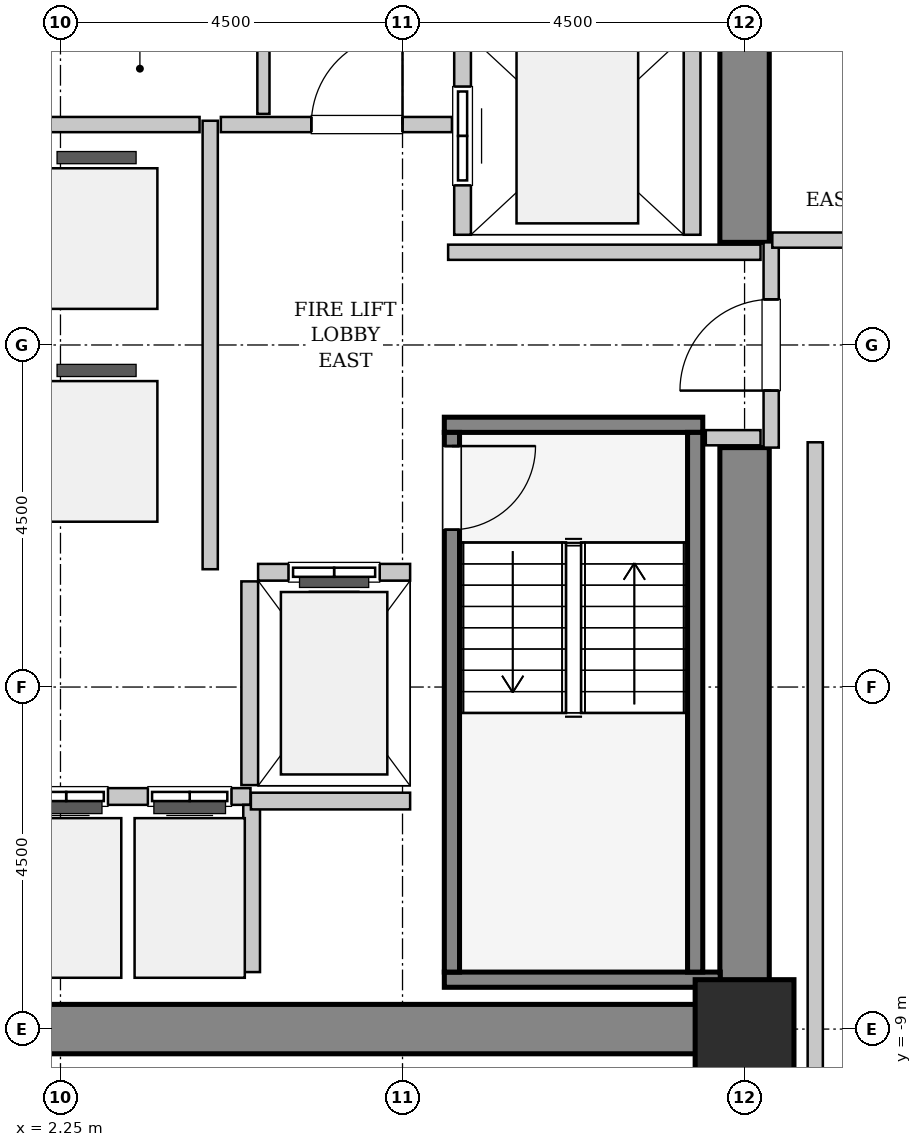
"""IFC4 building model, lengths in metres.
Left out: names, types, materials, properties, quantities, classifications, styles, units other than length and angle.
Written with IfcOpenShell. Run it as: python <this file> out.ifc"""

import sys

from ifc_helpers import new_model, si_unit, direction, frame, frame_2d, origin, origin_2d, place, context, subcontext, project, spatial, rectangle, hollow_rectangle, extrude, source, transform, mapped, element, fill, save


model = new_model("IFC4")
c1 = context("Model", 3, precision=1e-05, world=origin(), true_north=direction((0.0, 1.0)))
c2 = subcontext(c1, "Body", "Model", "MODEL_VIEW")
j1 = project(units=[si_unit("LENGTHUNIT", "METRE"), si_unit("PLANEANGLEUNIT", "RADIAN")], contexts=[c1])
p1 = place(None, origin())
s1 = spatial("IfcSite", under=j1, at=p1, CompositionType="ELEMENT")
p2 = place(p1, origin())
s2 = spatial("IfcBuilding", under=s1, at=p2, CompositionType="ELEMENT")
p3 = place(p2, origin())
s3 = spatial("IfcBuildingStorey", under=s2, at=p3, CompositionType="ELEMENT", Elevation=0.0)
m1 = source(origin(), c2, "Body", "SweptSolid", [
    extrude(rectangle(XDim=10.025, YDim=0.65, at=frame_2d((5.012, 0.0))), origin(), (0.0, 0.0, 1.0), 6.0),
])
p4 = place(p3, frame((1.55, -9.0, 0.0), z_axis=(0.0, 0.0, 1.0), x_axis=(1.0, 0.0, 0.0)))
e1 = element("IfcWall", 1, at=p4, inside=s3, PredefinedType="SHEAR", context=c2, shape_type="MappedRepresentation", body=[
    mapped(m1, transform((0.0, 0.0, 0.0), x_axis=(1.0, 0.0, 0.0), y_axis=(0.0, 1.0, 0.0), z_axis=(0.0, 0.0, 1.0), scale=1.0)),
])
m2 = source(origin(), c2, "Body", "SweptSolid", [
    extrude(rectangle(XDim=7.325, YDim=0.65, at=frame_2d((3.663, 0.0))), origin(), (0.0, 0.0, 1.0), 6.0),
])
for number, where, z_axis, x_axis in (
    (2, (11.25, -8.675, 0.0), (0.0, 0.0, 1.0), (0.0, 1.0, 0.0)),
    (3, (11.25, 1.35, 0.0), (0.0, 0.0, 1.0), (0.0, 1.0, 0.0)),
):
    element("IfcWall", number, at=place(p3, frame(where, z_axis=z_axis, x_axis=x_axis)), inside=s3, PredefinedType="SHEAR", context=c2, shape_type="MappedRepresentation", body=[
        mapped(m2, transform((0.0, 0.0, 0.0), x_axis=(1.0, 0.0, 0.0), y_axis=(0.0, 1.0, 0.0), z_axis=(0.0, 0.0, 1.0), scale=1.0)),
    ])
m3 = source(origin(), c2, "Body", "SweptSolid", [
    extrude(hollow_rectangle(XDim=1.3, YDim=1.3, WallThickness=0.065, InnerFilletRadius=0.065, OuterFilletRadius=0.13, at=origin_2d()), origin(), (0.0, 0.0, 1.0), 6.0),
])
p5 = place(p3, frame((11.25, -9.0, 0.0), z_axis=(0.0, 0.0, 1.0), x_axis=(1.0, 0.0, 0.0)))
e4 = element("IfcColumn", 4, at=p5, inside=s3, PredefinedType="COLUMN", context=c2, shape_type="MappedRepresentation", body=[
    mapped(m3, transform((0.0, 0.0, 0.0), x_axis=(1.0, 0.0, 0.0), y_axis=(0.0, 1.0, 0.0), z_axis=(0.0, 0.0, 1.0), scale=1.0)),
])
m4 = source(origin(), c2, "Body", "SweptSolid", [
    extrude(rectangle(XDim=3.4, YDim=0.2, at=frame_2d((1.7, 0.0))), origin(), (0.0, 0.0, 1.0), 6.0),
])
p6 = place(p3, frame((7.3, -1.05, 0.0), z_axis=(0.0, 0.0, 1.0), x_axis=(1.0, 0.0, 0.0)))
e5 = element("IfcWall", 5, at=p6, inside=s3, PredefinedType="SOLIDWALL", context=c2, shape_type="MappedRepresentation", body=[
    mapped(m4, transform((0.0, 0.0, 0.0), x_axis=(1.0, 0.0, 0.0), y_axis=(0.0, 1.0, 0.0), z_axis=(0.0, 0.0, 1.0), scale=1.0)),
])
m5 = source(origin(), c2, "Body", "SweptSolid", [
    extrude(rectangle(XDim=3.63, YDim=0.2, at=frame_2d((1.815, 0.0))), origin(), (0.0, 0.0, 1.0), 6.0),
])
p7 = place(p3, frame((7.3, -8.35, 0.0), z_axis=(0.0, 0.0, 1.0), x_axis=(1.0, 0.0, 0.0)))
e6 = element("IfcWall", 6, at=p7, inside=s3, PredefinedType="SOLIDWALL", context=c2, shape_type="MappedRepresentation", body=[
    mapped(m5, transform((0.0, 0.0, 0.0), x_axis=(1.0, 0.0, 0.0), y_axis=(0.0, 1.0, 0.0), z_axis=(0.0, 0.0, 1.0), scale=1.0)),
])
m6 = source(origin(), c2, "Body", "SweptSolid", [
    extrude(rectangle(XDim=7.1, YDim=0.2, at=frame_2d((3.55, 0.0))), origin(), (0.0, 0.0, 1.0), 6.0),
])
p8 = place(p3, frame((7.4, -1.15, 0.0), z_axis=(0.0, 0.0, 1.0), x_axis=(0.0, -1.0, 0.0)))
e7 = element("IfcWall", 7, at=p8, inside=s3, PredefinedType="SOLIDWALL", context=c2, shape_type="MappedRepresentation", body=[
    mapped(m6, transform((0.0, 0.0, 0.0), x_axis=(1.0, 0.0, 0.0), y_axis=(0.0, 1.0, 0.0), z_axis=(0.0, 0.0, 1.0), scale=1.0)),
])
p9 = place(p8, frame((0.18, 0.0, 0.0)))
e8 = element("IfcOpeningElement", 8, at=p9, cuts=e7, PredefinedType="OPENING", context=c2, shape_type="SweptSolid", body=[
    extrude(rectangle(XDim=1.1, YDim=2.15, at=frame_2d((0.55, 1.075))), frame((0.0, 0.11, 0.0), z_axis=(0.0, -1.0, 0.0), x_axis=(1.0, 0.0, 0.0)), (0.0, 0.0, 1.0), 0.22),
])
p10 = place(p3, frame((10.6, -1.15, 0.0), z_axis=(0.0, 0.0, 1.0), x_axis=(0.0, -1.0, 0.0)))
e9 = element("IfcWall", 9, at=p10, inside=s3, PredefinedType="SOLIDWALL", context=c2, shape_type="MappedRepresentation", body=[
    mapped(m6, transform((0.0, 0.0, 0.0), x_axis=(1.0, 0.0, 0.0), y_axis=(0.0, 1.0, 0.0), z_axis=(0.0, 0.0, 1.0), scale=1.0)),
])
m7 = source(origin(), c2, "Body", "SweptSolid", [
    extrude(rectangle(XDim=2.0, YDim=0.22, at=frame_2d((1.0, 0.0))), origin(), (0.0, 0.0, 1.0), 5.685),
])
p11 = place(p3, frame((6.85, -2.99, 0.0), z_axis=(0.0, 0.0, 1.0), x_axis=(-1.0, 0.0, 0.0)))
e10 = element("IfcWall", 10, at=p11, inside=s3, PredefinedType="SOLIDWALL", context=c2, shape_type="MappedRepresentation", body=[
    mapped(m7, transform((0.0, 0.0, 0.0), x_axis=(1.0, 0.0, 0.0), y_axis=(0.0, 1.0, 0.0), z_axis=(0.0, 0.0, 1.0), scale=1.0)),
])
p12 = place(p11, frame((0.4, 0.0, 0.0)))
e11 = element("IfcOpeningElement", 11, at=p12, cuts=e10, PredefinedType="OPENING", context=c2, shape_type="SweptSolid", body=[
    extrude(rectangle(XDim=1.2, YDim=2.2, at=frame_2d((0.6, 1.1))), frame((0.0, 0.12, 0.0), z_axis=(0.0, -1.0, 0.0), x_axis=(1.0, 0.0, 0.0)), (0.0, 0.0, 1.0), 0.24),
])
m8 = source(origin(), c2, "Body", "SweptSolid", [
    extrude(rectangle(XDim=2.68, YDim=0.22, at=frame_2d((1.34, 0.0))), origin(), (0.0, 0.0, 1.0), 5.685),
])
p13 = place(p3, frame((4.74, -3.11, 0.0), z_axis=(0.0, 0.0, 1.0), x_axis=(0.0, -1.0, 0.0)))
e12 = element("IfcWall", 12, at=p13, inside=s3, PredefinedType="SOLIDWALL", context=c2, shape_type="MappedRepresentation", body=[
    mapped(m8, transform((0.0, 0.0, 0.0), x_axis=(1.0, 0.0, 0.0), y_axis=(0.0, 1.0, 0.0), z_axis=(0.0, 0.0, 1.0), scale=1.0)),
])
m9 = source(origin(), c2, "Body", "SweptSolid", [
    extrude(rectangle(XDim=5.45, YDim=0.22, at=frame_2d((2.725, 0.0))), origin(), (0.0, 0.0, 1.0), 5.685),
])
p14 = place(p3, frame((7.54, 6.9, 0.0), z_axis=(0.0, 0.0, 1.0), x_axis=(0.0, -1.0, 0.0)))
e13 = element("IfcWall", 13, at=p14, inside=s3, PredefinedType="SOLIDWALL", context=c2, shape_type="MappedRepresentation", body=[
    mapped(m9, transform((0.0, 0.0, 0.0), x_axis=(1.0, 0.0, 0.0), y_axis=(0.0, 1.0, 0.0), z_axis=(0.0, 0.0, 1.0), scale=1.0)),
])
p15 = place(p14, frame((3.5, 0.0, 0.0)))
e14 = element("IfcOpeningElement", 14, at=p15, cuts=e13, PredefinedType="OPENING", context=c2, shape_type="SweptSolid", body=[
    extrude(rectangle(XDim=1.3, YDim=2.3, at=frame_2d((0.65, 1.15))), frame((0.0, 0.12, 0.0), z_axis=(0.0, -1.0, 0.0), x_axis=(1.0, 0.0, 0.0)), (0.0, 0.0, 1.0), 0.24),
])
p16 = place(p14, frame((0.65, 0.0, 0.0)))
e15 = element("IfcOpeningElement", 15, at=p16, cuts=e13, PredefinedType="OPENING", context=c2, shape_type="SweptSolid", body=[
    extrude(rectangle(XDim=1.3, YDim=2.3, at=frame_2d((0.65, 1.15))), frame((0.0, 0.12, 0.0), z_axis=(0.0, -1.0, 0.0), x_axis=(1.0, 0.0, 0.0)), (0.0, 0.0, 1.0), 0.24),
])
p17 = place(p3, frame((10.56, 1.45, 0.0), z_axis=(0.0, 0.0, 1.0), x_axis=(0.0, 1.0, 0.0)))
e16 = element("IfcWall", 16, at=p17, inside=s3, PredefinedType="SOLIDWALL", context=c2, shape_type="MappedRepresentation", body=[
    mapped(m9, transform((0.0, 0.0, 0.0), x_axis=(1.0, 0.0, 0.0), y_axis=(0.0, 1.0, 0.0), z_axis=(0.0, 0.0, 1.0), scale=1.0)),
])
m10 = source(origin(), c2, "Body", "SweptSolid", [
    extrude(rectangle(XDim=3.2, YDim=0.22, at=frame_2d((1.6, 0.0))), origin(), (0.0, 0.0, 1.0), 5.685),
])
p18 = place(p3, frame((4.75, -5.94, 0.0), z_axis=(0.0, 0.0, 1.0), x_axis=(-1.0, 0.0, 0.0)))
e17 = element("IfcWall", 17, at=p18, inside=s3, PredefinedType="SOLIDWALL", context=c2, shape_type="MappedRepresentation", body=[
    mapped(m10, transform((0.0, 0.0, 0.0), x_axis=(1.0, 0.0, 0.0), y_axis=(0.0, 1.0, 0.0), z_axis=(0.0, 0.0, 1.0), scale=1.0)),
])
p19 = place(p18, frame((1.875, 0.0, 0.0)))
e18 = element("IfcOpeningElement", 18, at=p19, cuts=e17, PredefinedType="OPENING", context=c2, shape_type="SweptSolid", body=[
    extrude(rectangle(XDim=1.1, YDim=2.2, at=frame_2d((0.55, 1.1))), frame((0.0, 0.12, 0.0), z_axis=(0.0, -1.0, 0.0), x_axis=(1.0, 0.0, 0.0)), (0.0, 0.0, 1.0), 0.24),
])
p20 = place(p18, frame((0.25, 0.0, 0.0)))
e19 = element("IfcOpeningElement", 19, at=p20, cuts=e17, PredefinedType="OPENING", context=c2, shape_type="SweptSolid", body=[
    extrude(rectangle(XDim=1.1, YDim=2.2, at=frame_2d((0.55, 1.1))), frame((0.0, 0.12, 0.0), z_axis=(0.0, -1.0, 0.0), x_axis=(1.0, 0.0, 0.0)), (0.0, 0.0, 1.0), 0.24),
])
m11 = source(origin(), c2, "Body", "SweptSolid", [
    extrude(rectangle(XDim=2.2, YDim=0.22, at=frame_2d((1.1, 0.0))), origin(), (0.0, 0.0, 1.0), 5.685),
])
p21 = place(p3, frame((4.765, -8.25, 0.0), z_axis=(0.0, 0.0, 1.0), x_axis=(0.0, 1.0, 0.0)))
e20 = element("IfcWall", 20, at=p21, inside=s3, PredefinedType="SOLIDWALL", context=c2, shape_type="MappedRepresentation", body=[
    mapped(m11, transform((0.0, 0.0, 0.0), x_axis=(1.0, 0.0, 0.0), y_axis=(0.0, 1.0, 0.0), z_axis=(0.0, 0.0, 1.0), scale=1.0)),
])
m12 = source(origin(), c2, "Body", "SweptSolid", [
    extrude(rectangle(XDim=2.095, YDim=0.22, at=frame_2d((1.048, 0.0))), origin(), (0.0, 0.0, 1.0), 5.685),
])
p22 = place(p3, frame((4.755, -6.0, 0.0), z_axis=(0.0, 0.0, 1.0), x_axis=(1.0, 0.0, 0.0)))
e21 = element("IfcWall", 21, at=p22, inside=s3, PredefinedType="SOLIDWALL", context=c2, shape_type="MappedRepresentation", body=[
    mapped(m12, transform((0.0, 0.0, 0.0), x_axis=(1.0, 0.0, 0.0), y_axis=(0.0, 1.0, 0.0), z_axis=(0.0, 0.0, 1.0), scale=1.0)),
])
m13 = source(origin(), c2, "Body", "SweptSolid", [
    extrude(rectangle(XDim=2.7, YDim=0.2, at=frame_2d((1.35, 0.0))), origin(), (0.0, 0.0, 1.0), 4.575),
])
p23 = place(p3, frame((11.6, -1.35, 0.0), z_axis=(0.0, 0.0, 1.0), x_axis=(0.0, 1.0, 0.0)))
e22 = element("IfcWall", 22, at=p23, inside=s3, PredefinedType="PARTITIONING", context=c2, shape_type="MappedRepresentation", body=[
    mapped(m13, transform((0.0, 0.0, 0.0), x_axis=(1.0, 0.0, 0.0), y_axis=(0.0, 1.0, 0.0), z_axis=(0.0, 0.0, 1.0), scale=1.0)),
])
p24 = place(p23, frame((0.75, 0.0, 0.0)))
e23 = element("IfcOpeningElement", 23, at=p24, cuts=e22, PredefinedType="OPENING", context=c2, shape_type="SweptSolid", body=[
    extrude(rectangle(XDim=1.2, YDim=2.15, at=frame_2d((0.6, 1.075))), frame((0.0, 0.11, 0.0), z_axis=(0.0, -1.0, 0.0), x_axis=(1.0, 0.0, 0.0)), (0.0, 0.0, 1.0), 0.22),
])
m14 = source(origin(), c2, "Body", "SweptSolid", [
    extrude(rectangle(XDim=5.9, YDim=0.2, at=frame_2d((2.95, 0.0))), origin(), (0.0, 0.0, 1.0), 5.685),
])
p25 = place(p3, frame((4.22, -2.95, 0.0), z_axis=(0.0, 0.0, 1.0), x_axis=(0.0, 1.0, 0.0)))
e24 = element("IfcWall", 24, at=p25, inside=s3, PredefinedType="PARTITIONING", context=c2, shape_type="MappedRepresentation", body=[
    mapped(m14, transform((0.0, 0.0, 0.0), x_axis=(1.0, 0.0, 0.0), y_axis=(0.0, 1.0, 0.0), z_axis=(0.0, 0.0, 1.0), scale=1.0)),
])
m15 = source(origin(), c2, "Body", "SweptSolid", [
    extrude(rectangle(XDim=2.52, YDim=0.2, at=frame_2d((1.26, 0.0))), origin(), (0.0, 0.0, 1.0), 5.685),
])
p26 = place(p3, frame((1.56, 2.9, 0.0), z_axis=(0.0, 0.0, 1.0), x_axis=(1.0, 0.0, 0.0)))
e25 = element("IfcWall", 25, at=p26, inside=s3, PredefinedType="PARTITIONING", context=c2, shape_type="MappedRepresentation", body=[
    mapped(m15, transform((0.0, 0.0, 0.0), x_axis=(1.0, 0.0, 0.0), y_axis=(0.0, 1.0, 0.0), z_axis=(0.0, 0.0, 1.0), scale=1.0)),
])
m16 = source(origin(), c2, "Body", "SweptSolid", [
    extrude(rectangle(XDim=3.04, YDim=0.2, at=frame_2d((1.52, 0.0))), origin(), (0.0, 0.0, 1.0), 5.685),
])
p27 = place(p3, frame((4.36, 2.9, 0.0), z_axis=(0.0, 0.0, 1.0), x_axis=(1.0, 0.0, 0.0)))
e26 = element("IfcWall", 26, at=p27, inside=s3, PredefinedType="PARTITIONING", context=c2, shape_type="MappedRepresentation", body=[
    mapped(m16, transform((0.0, 0.0, 0.0), x_axis=(1.0, 0.0, 0.0), y_axis=(0.0, 1.0, 0.0), z_axis=(0.0, 0.0, 1.0), scale=1.0)),
])
p28 = place(p27, frame((1.19, 0.0, 0.0)))
e27 = element("IfcOpeningElement", 27, at=p28, cuts=e26, PredefinedType="OPENING", context=c2, shape_type="SweptSolid", body=[
    extrude(rectangle(XDim=1.2, YDim=2.15, at=frame_2d((0.6, 1.075))), frame((0.0, 0.11, 0.0), z_axis=(0.0, -1.0, 0.0), x_axis=(1.0, 0.0, 0.0)), (0.0, 0.0, 1.0), 0.22),
])
m17 = source(origin(), c2, "Body", "SweptSolid", [
    extrude(rectangle(XDim=4.11, YDim=0.2, at=frame_2d((2.055, 0.0))), origin(), (0.0, 0.0, 1.0), 5.685),
])
p29 = place(p3, frame((7.35, 1.22, 0.0), z_axis=(0.0, 0.0, 1.0), x_axis=(1.0, 0.0, 0.0)))
e28 = element("IfcWall", 28, at=p29, inside=s3, PredefinedType="PARTITIONING", context=c2, shape_type="MappedRepresentation", body=[
    mapped(m17, transform((0.0, 0.0, 0.0), x_axis=(1.0, 0.0, 0.0), y_axis=(0.0, 1.0, 0.0), z_axis=(0.0, 0.0, 1.0), scale=1.0)),
])
m18 = source(origin(), c2, "Body", "SweptSolid", [
    extrude(rectangle(XDim=0.72, YDim=0.2, at=frame_2d((0.36, 0.0))), origin(), (0.0, 0.0, 1.0), 5.685),
])
p30 = place(p3, frame((10.74, -1.22, 0.0), z_axis=(0.0, 0.0, 1.0), x_axis=(1.0, 0.0, 0.0)))
e29 = element("IfcWall", 29, at=p30, inside=s3, PredefinedType="PARTITIONING", context=c2, shape_type="MappedRepresentation", body=[
    mapped(m18, transform((0.0, 0.0, 0.0), x_axis=(1.0, 0.0, 0.0), y_axis=(0.0, 1.0, 0.0), z_axis=(0.0, 0.0, 1.0), scale=1.0)),
])
m19 = source(origin(), c2, "Body", "SweptSolid", [
    extrude(rectangle(XDim=4.01, YDim=0.16, at=frame_2d((2.005, 0.0))), origin(), (0.0, 0.0, 1.0), 5.685),
])
p31 = place(p3, frame((4.92, 3.04, 0.0), z_axis=(0.0, 0.0, 1.0), x_axis=(0.0, 1.0, 0.0)))
e30 = element("IfcWall", 30, at=p31, inside=s3, PredefinedType="PARTITIONING", context=c2, shape_type="MappedRepresentation", body=[
    mapped(m19, transform((0.0, 0.0, 0.0), x_axis=(1.0, 0.0, 0.0), y_axis=(0.0, 1.0, 0.0), z_axis=(0.0, 0.0, 1.0), scale=1.0)),
])
m20 = source(origin(), c2, "Body", "SweptSolid", [
    extrude(rectangle(XDim=23.55, YDim=0.2, at=frame_2d((11.775, 0.0))), origin(), (0.0, 0.0, 1.0), 5.685),
])
p32 = place(p3, frame((12.18, -24.83, 0.0), z_axis=(0.0, 0.0, 1.0), x_axis=(0.0, 1.0, 0.0)))
e31 = element("IfcWall", 31, at=p32, inside=s3, PredefinedType="PARTITIONING", context=c2, shape_type="MappedRepresentation", body=[
    mapped(m20, transform((0.0, 0.0, 0.0), x_axis=(1.0, 0.0, 0.0), y_axis=(0.0, 1.0, 0.0), z_axis=(0.0, 0.0, 1.0), scale=1.0)),
])
m21 = source(origin(), c2, "Body", "SweptSolid", [
    extrude(rectangle(XDim=3.605, YDim=0.2, at=frame_2d((1.802, 0.0))), origin(), (0.0, 0.0, 1.0), 5.685),
])
p33 = place(p3, frame((11.615, 1.38, 0.0), z_axis=(0.0, 0.0, 1.0), x_axis=(1.0, 0.0, 0.0)))
e32 = element("IfcWall", 32, at=p33, inside=s3, PredefinedType="PARTITIONING", context=c2, shape_type="MappedRepresentation", body=[
    mapped(m21, transform((0.0, 0.0, 0.0), x_axis=(1.0, 0.0, 0.0), y_axis=(0.0, 1.0, 0.0), z_axis=(0.0, 0.0, 1.0), scale=1.0)),
])
m22 = source(origin(), c2, "Body", "SweptSolid", [
    extrude(rectangle(XDim=1.1, YDim=2.15, at=frame_2d((0.55, 1.075))), frame((0.0, 0.025, 0.0), z_axis=(0.0, -1.0, 0.0), x_axis=(1.0, 0.0, 0.0)), (0.0, 0.0, 1.0), 0.05),
])
p34 = place(p9, frame((1.1, 0.0, 0.0), z_axis=(0.0, 0.0, 1.0), x_axis=(-1.0, 0.0, 0.0)))
e33 = element("IfcDoor", 33, at=p34, inside=s3, OperationType="SINGLE_SWING_LEFT", PredefinedType="DOOR", context=c2, shape_type="MappedRepresentation", body=[
    mapped(m22, transform((0.0, 0.0, 0.0), x_axis=(1.0, 0.0, 0.0), y_axis=(0.0, 1.0, 0.0), z_axis=(0.0, 0.0, 1.0), scale=1.0)),
])
fill(e8, e33)
m23 = source(origin(), c2, "Body", "SweptSolid", [
    extrude(rectangle(XDim=1.2, YDim=2.2, at=frame_2d((0.6, 1.1))), frame((0.0, 0.025, 0.0), z_axis=(0.0, -1.0, 0.0), x_axis=(1.0, 0.0, 0.0)), (0.0, 0.0, 1.0), 0.05),
])
p35 = place(p12, origin())
e34 = element("IfcDoor", 34, at=p35, inside=s3, OperationType="SLIDING_TO_LEFT", PredefinedType="DOOR", context=c2, shape_type="MappedRepresentation", body=[
    mapped(m23, transform((0.0, 0.0, 0.0), x_axis=(1.0, 0.0, 0.0), y_axis=(0.0, 1.0, 0.0), z_axis=(0.0, 0.0, 1.0), scale=1.0)),
])
fill(e11, e34)
m24 = source(origin(), c2, "Body", "SweptSolid", [
    extrude(rectangle(XDim=1.3, YDim=2.3, at=frame_2d((0.65, 1.15))), frame((0.0, 0.025, 0.0), z_axis=(0.0, -1.0, 0.0), x_axis=(1.0, 0.0, 0.0)), (0.0, 0.0, 1.0), 0.05),
])
p36 = place(p15, origin())
e35 = element("IfcDoor", 35, at=p36, inside=s3, OperationType="SLIDING_TO_RIGHT", PredefinedType="DOOR", context=c2, shape_type="MappedRepresentation", body=[
    mapped(m24, transform((0.0, 0.0, 0.0), x_axis=(1.0, 0.0, 0.0), y_axis=(0.0, 1.0, 0.0), z_axis=(0.0, 0.0, 1.0), scale=1.0)),
])
fill(e14, e35)
m25 = source(origin(), c2, "Body", "SweptSolid", [
    extrude(rectangle(XDim=1.1, YDim=2.2, at=frame_2d((0.55, 1.1))), frame((0.0, 0.025, 0.0), z_axis=(0.0, -1.0, 0.0), x_axis=(1.0, 0.0, 0.0)), (0.0, 0.0, 1.0), 0.05),
])
p37 = place(p19, origin())
e36 = element("IfcDoor", 36, at=p37, inside=s3, OperationType="DOUBLE_DOOR_SLIDING", PredefinedType="DOOR", context=c2, shape_type="MappedRepresentation", body=[
    mapped(m25, transform((0.0, 0.0, 0.0), x_axis=(1.0, 0.0, 0.0), y_axis=(0.0, 1.0, 0.0), z_axis=(0.0, 0.0, 1.0), scale=1.0)),
])
fill(e18, e36)
p38 = place(p20, origin())
e37 = element("IfcDoor", 37, at=p38, inside=s3, OperationType="DOUBLE_DOOR_SLIDING", PredefinedType="DOOR", context=c2, shape_type="MappedRepresentation", body=[
    mapped(m25, transform((0.0, 0.0, 0.0), x_axis=(1.0, 0.0, 0.0), y_axis=(0.0, 1.0, 0.0), z_axis=(0.0, 0.0, 1.0), scale=1.0)),
])
fill(e19, e37)
m26 = source(origin(), c2, "Body", "SweptSolid", [
    extrude(rectangle(XDim=1.2, YDim=2.15, at=frame_2d((0.6, 1.075))), frame((0.0, 0.025, 0.0), z_axis=(0.0, -1.0, 0.0), x_axis=(1.0, 0.0, 0.0)), (0.0, 0.0, 1.0), 0.05),
])
p39 = place(p24, frame((1.2, 0.0, 0.0), z_axis=(0.0, 0.0, 1.0), x_axis=(-1.0, 0.0, 0.0)))
e38 = element("IfcDoor", 38, at=p39, inside=s3, OperationType="SINGLE_SWING_LEFT", PredefinedType="DOOR", context=c2, shape_type="MappedRepresentation", body=[
    mapped(m26, transform((0.0, 0.0, 0.0), x_axis=(1.0, 0.0, 0.0), y_axis=(0.0, 1.0, 0.0), z_axis=(0.0, 0.0, 1.0), scale=1.0)),
])
fill(e23, e38)
p40 = place(p28, origin())
e39 = element("IfcDoor", 39, at=p40, inside=s3, OperationType="SINGLE_SWING_RIGHT", PredefinedType="DOOR", context=c2, shape_type="MappedRepresentation", body=[
    mapped(m26, transform((0.0, 0.0, 0.0), x_axis=(1.0, 0.0, 0.0), y_axis=(0.0, 1.0, 0.0), z_axis=(0.0, 0.0, 1.0), scale=1.0)),
])
fill(e27, e39)
save(model, sys.argv[1])
